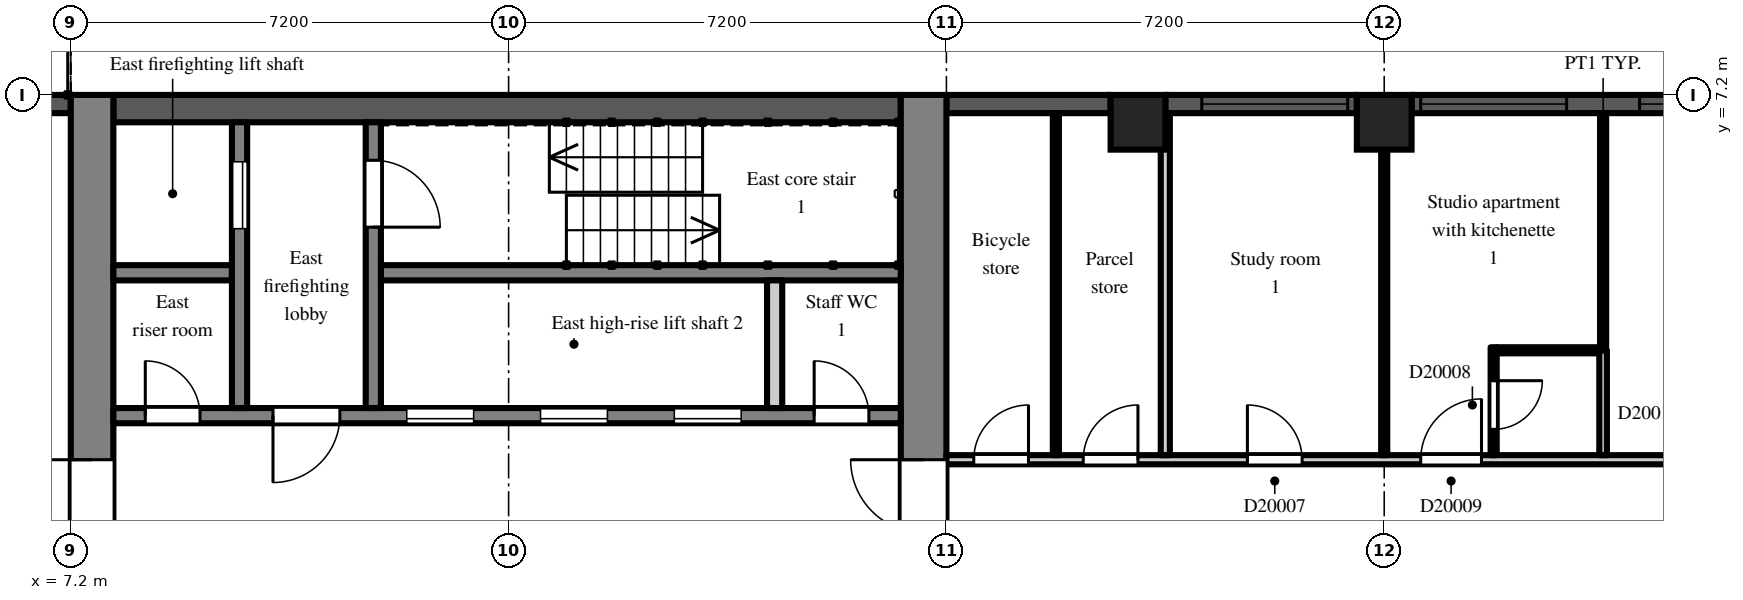
"""IFC4 building model, lengths in metres.
Left out: names, types, materials, properties, quantities, classifications, styles, units other than length and angle.
Written with IfcOpenShell. Run it as: python <this file> out.ifc"""

import sys

from ifc_helpers import new_model, si_unit, direction, frame, frame_2d, origin, origin_2d, place, context, subcontext, project, spatial, rectangle, extrude, element, fill, save


model = new_model("IFC4")
c1 = context("Model", 3, precision=1e-05, world=origin(), true_north=direction((0.0, 1.0)))
c2 = subcontext(c1, "Body", "Model", "MODEL_VIEW")
j1 = project(units=[si_unit("LENGTHUNIT", "METRE"), si_unit("PLANEANGLEUNIT", "RADIAN")], contexts=[c1])
p1 = place(None, origin())
s1 = spatial("IfcSite", under=j1, at=p1, CompositionType="ELEMENT")
p2 = place(p1, origin())
s2 = spatial("IfcBuilding", under=s1, at=p2, CompositionType="ELEMENT")
p3 = place(p2, frame((0.0, 0.0, 138.3)))
s3 = spatial("IfcBuildingStorey", under=s2, at=p3, CompositionType="ELEMENT", Elevation=138.3)
for number, where, z_axis, x_axis in (
    (1, (24.75, 6.75, 0.0), (0.0, 0.0, 1.0), (1.0, 0.0, 0.0)),
    (2, (28.8, 6.75, 0.0), (0.0, 0.0, 1.0), (1.0, 0.0, 0.0)),
):
    element("IfcColumn", number, at=place(p3, frame(where, z_axis=z_axis, x_axis=x_axis)), inside=s3, PredefinedType="COLUMN", context=c2, shape_type="SweptSolid", body=[
        extrude(rectangle(XDim=0.9, YDim=0.9, at=origin_2d()), origin(), (0.0, 0.0, 1.0), 3.0),
    ])
p4 = place(p3, frame((35.55, 7.05, 0.0), z_axis=(0.0, 0.0, 1.0), x_axis=(-1.0, 0.0, 0.0)))
e3 = element("IfcWall", 3, at=p4, inside=s3, PredefinedType="SOLIDWALL", context=c2, shape_type="SweptSolid", body=[
    extrude(rectangle(XDim=6.3, YDim=0.3, at=frame_2d((3.15, 0.0))), origin(), (0.0, 0.0, 1.0), 2.2),
])
p5 = place(p4, frame((0.15, 0.0, 0.2)))
e4 = element("IfcOpeningElement", 4, at=p5, cuts=e3, PredefinedType="OPENING", context=c2, shape_type="SweptSolid", body=[
    extrude(rectangle(XDim=2.4, YDim=1.85, at=frame_2d((1.2, 0.925))), frame((0.0, 0.16, 0.0), z_axis=(0.0, -1.0, 0.0), x_axis=(1.0, 0.0, 0.0)), (0.0, 0.0, 1.0), 0.32),
])
p6 = place(p4, frame((3.75, 0.0, 0.2)))
e5 = element("IfcOpeningElement", 5, at=p6, cuts=e3, PredefinedType="OPENING", context=c2, shape_type="SweptSolid", body=[
    extrude(rectangle(XDim=2.4, YDim=1.85, at=frame_2d((1.2, 0.925))), frame((0.0, 0.16, 0.0), z_axis=(0.0, -1.0, 0.0), x_axis=(1.0, 0.0, 0.0)), (0.0, 0.0, 1.0), 0.32),
])
p7 = place(p3, frame((28.35, 7.05, 0.0), z_axis=(0.0, 0.0, 1.0), x_axis=(-1.0, 0.0, 0.0)))
e6 = element("IfcWall", 6, at=p7, inside=s3, PredefinedType="SOLIDWALL", context=c2, shape_type="SweptSolid", body=[
    extrude(rectangle(XDim=3.15, YDim=0.3, at=frame_2d((1.575, 0.0))), origin(), (0.0, 0.0, 1.0), 2.2),
])
p8 = place(p7, frame((0.15, 0.0, 0.2)))
e7 = element("IfcOpeningElement", 7, at=p8, cuts=e6, PredefinedType="OPENING", context=c2, shape_type="SweptSolid", body=[
    extrude(rectangle(XDim=2.4, YDim=1.85, at=frame_2d((1.2, 0.925))), frame((0.0, 0.16, 0.0), z_axis=(0.0, -1.0, 0.0), x_axis=(1.0, 0.0, 0.0)), (0.0, 0.0, 1.0), 0.32),
])
p9 = place(p3, frame((24.3, 7.05, 0.0), z_axis=(0.0, 0.0, 1.0), x_axis=(-1.0, 0.0, 0.0)))
e8 = element("IfcWall", 8, at=p9, inside=s3, PredefinedType="SOLIDWALL", context=c2, shape_type="SweptSolid", body=[
    extrude(rectangle(XDim=2.7, YDim=0.3, at=frame_2d((1.35, 0.0))), origin(), (0.0, 0.0, 1.0), 2.2),
])
p10 = place(p3, frame((7.2, 7.05, 0.0), z_axis=(0.0, 0.0, 1.0), x_axis=(-1.0, 0.0, 0.0)))
e9 = element("IfcWall", 9, at=p10, inside=s3, PredefinedType="SOLIDWALL", context=c2, shape_type="SweptSolid", body=[
    extrude(rectangle(XDim=3.0, YDim=0.3, at=frame_2d((1.5, 0.0))), origin(), (0.0, 0.0, 1.0), 2.2),
])
p11 = place(p3, frame((7.55, -7.2, 0.0), z_axis=(0.0, 0.0, 1.0), x_axis=(0.0, 1.0, 0.0)))
e10 = element("IfcWall", 10, at=p11, inside=s3, PredefinedType="SHEAR", context=c2, shape_type="SweptSolid", body=[
    extrude(rectangle(XDim=14.4, YDim=0.7, at=frame_2d((7.2, 0.0))), origin(), (0.0, 0.0, 1.0), 2.6),
])
p12 = place(p11, frame((6.0, 0.0, 0.0)))
e11 = element("IfcOpeningElement", 11, at=p12, cuts=e10, PredefinedType="OPENING", context=c2, shape_type="SweptSolid", body=[
    extrude(rectangle(XDim=2.4, YDim=2.2, at=frame_2d((1.2, 1.1))), frame((0.0, 0.36, 0.0), z_axis=(0.0, -1.0, 0.0), x_axis=(1.0, 0.0, 0.0)), (0.0, 0.0, 1.0), 0.72),
])
p13 = place(p3, frame((21.225, -7.2, 0.0), z_axis=(0.0, 0.0, 1.0), x_axis=(0.0, 1.0, 0.0)))
e12 = element("IfcWall", 12, at=p13, inside=s3, PredefinedType="SHEAR", context=c2, shape_type="SweptSolid", body=[
    extrude(rectangle(XDim=14.4, YDim=0.75, at=frame_2d((7.2, 0.0))), origin(), (0.0, 0.0, 1.0), 2.6),
])
p14 = place(p13, frame((6.0, 0.0, 0.0)))
e13 = element("IfcOpeningElement", 13, at=p14, cuts=e12, PredefinedType="OPENING", context=c2, shape_type="SweptSolid", body=[
    extrude(rectangle(XDim=2.4, YDim=2.2, at=frame_2d((1.2, 1.1))), frame((0.0, 0.385, 0.0), z_axis=(0.0, -1.0, 0.0), x_axis=(1.0, 0.0, 0.0)), (0.0, 0.0, 1.0), 0.77),
])
p15 = place(p3, frame((7.9, 6.975, 0.0), z_axis=(0.0, 0.0, 1.0), x_axis=(1.0, 0.0, 0.0)))
e14 = element("IfcWall", 14, at=p15, inside=s3, PredefinedType="SHEAR", context=c2, shape_type="SweptSolid", body=[
    extrude(rectangle(XDim=12.95, YDim=0.45, at=frame_2d((6.475, 0.0))), origin(), (0.0, 0.0, 1.0), 2.6),
])
p16 = place(p3, frame((7.9, 1.925, 0.0), z_axis=(0.0, 0.0, 1.0), x_axis=(1.0, 0.0, 0.0)))
e15 = element("IfcWall", 15, at=p16, inside=s3, PredefinedType="SHEAR", context=c2, shape_type="SweptSolid", body=[
    extrude(rectangle(XDim=12.95, YDim=0.25, at=frame_2d((6.475, 0.0))), origin(), (0.0, 0.0, 1.0), 2.6),
])
p17 = place(p16, frame((4.825, 0.0, 0.0)))
e16 = element("IfcOpeningElement", 16, at=p17, cuts=e15, PredefinedType="OPENING", context=c2, shape_type="SweptSolid", body=[
    extrude(rectangle(XDim=1.1, YDim=2.1, at=frame_2d((0.55, 1.05))), frame((0.0, 0.135, 0.0), z_axis=(0.0, -1.0, 0.0), x_axis=(1.0, 0.0, 0.0)), (0.0, 0.0, 1.0), 0.27),
])
p18 = place(p16, frame((7.025, 0.0, 0.0)))
e17 = element("IfcOpeningElement", 17, at=p18, cuts=e15, PredefinedType="OPENING", context=c2, shape_type="SweptSolid", body=[
    extrude(rectangle(XDim=1.1, YDim=2.1, at=frame_2d((0.55, 1.05))), frame((0.0, 0.135, 0.0), z_axis=(0.0, -1.0, 0.0), x_axis=(1.0, 0.0, 0.0)), (0.0, 0.0, 1.0), 0.27),
])
p19 = place(p16, frame((9.225, 0.0, 0.0)))
e18 = element("IfcOpeningElement", 18, at=p19, cuts=e15, PredefinedType="OPENING", context=c2, shape_type="SweptSolid", body=[
    extrude(rectangle(XDim=1.1, YDim=2.1, at=frame_2d((0.55, 1.05))), frame((0.0, 0.135, 0.0), z_axis=(0.0, -1.0, 0.0), x_axis=(1.0, 0.0, 0.0)), (0.0, 0.0, 1.0), 0.27),
])
p20 = place(p16, frame((0.525, 0.0, 0.0)))
e19 = element("IfcOpeningElement", 19, at=p20, cuts=e15, PredefinedType="OPENING", context=c2, shape_type="SweptSolid", body=[
    extrude(rectangle(XDim=0.9, YDim=2.1, at=frame_2d((0.45, 1.05))), frame((0.0, 0.135, 0.0), z_axis=(0.0, -1.0, 0.0), x_axis=(1.0, 0.0, 0.0)), (0.0, 0.0, 1.0), 0.27),
])
p21 = place(p16, frame((2.625, 0.0, 0.0)))
e20 = element("IfcOpeningElement", 20, at=p21, cuts=e15, PredefinedType="OPENING", context=c2, shape_type="SweptSolid", body=[
    extrude(rectangle(XDim=1.1, YDim=2.1, at=frame_2d((0.55, 1.05))), frame((0.0, 0.135, 0.0), z_axis=(0.0, -1.0, 0.0), x_axis=(1.0, 0.0, 0.0)), (0.0, 0.0, 1.0), 0.27),
])
p22 = place(p16, frame((11.525, 0.0, 0.0)))
e21 = element("IfcOpeningElement", 21, at=p22, cuts=e15, PredefinedType="OPENING", context=c2, shape_type="SweptSolid", body=[
    extrude(rectangle(XDim=0.9, YDim=2.1, at=frame_2d((0.45, 1.05))), frame((0.0, 0.135, 0.0), z_axis=(0.0, -1.0, 0.0), x_axis=(1.0, 0.0, 0.0)), (0.0, 0.0, 1.0), 0.27),
])
p23 = place(p3, frame((7.9, 4.275, 0.0), z_axis=(0.0, 0.0, 1.0), x_axis=(1.0, 0.0, 0.0)))
e22 = element("IfcWall", 22, at=p23, inside=s3, PredefinedType="SHEAR", context=c2, shape_type="SweptSolid", body=[
    extrude(rectangle(XDim=1.95, YDim=0.25, at=frame_2d((0.975, 0.0))), origin(), (0.0, 0.0, 1.0), 2.6),
])
p24 = place(p3, frame((12.3, 4.275, 0.0), z_axis=(0.0, 0.0, 1.0), x_axis=(1.0, 0.0, 0.0)))
e23 = element("IfcWall", 23, at=p24, inside=s3, PredefinedType="SHEAR", context=c2, shape_type="SweptSolid", body=[
    extrude(rectangle(XDim=8.55, YDim=0.25, at=frame_2d((4.275, 0.0))), origin(), (0.0, 0.0, 1.0), 2.6),
])
p25 = place(p3, frame((9.975, 2.05, 0.0), z_axis=(0.0, 0.0, 1.0), x_axis=(0.0, 1.0, 0.0)))
e24 = element("IfcWall", 24, at=p25, inside=s3, PredefinedType="SHEAR", context=c2, shape_type="SweptSolid", body=[
    extrude(rectangle(XDim=4.7, YDim=0.25, at=frame_2d((2.35, 0.0))), origin(), (0.0, 0.0, 1.0), 2.6),
])
p26 = place(p25, frame((2.95, 0.0, 0.0)))
e25 = element("IfcOpeningElement", 25, at=p26, cuts=e24, PredefinedType="OPENING", context=c2, shape_type="SweptSolid", body=[
    extrude(rectangle(XDim=1.1, YDim=2.1, at=frame_2d((0.55, 1.05))), frame((0.0, 0.135, 0.0), z_axis=(0.0, -1.0, 0.0), x_axis=(1.0, 0.0, 0.0)), (0.0, 0.0, 1.0), 0.27),
])
p27 = place(p3, frame((12.175, 2.05, 0.0), z_axis=(0.0, 0.0, 1.0), x_axis=(0.0, 1.0, 0.0)))
e26 = element("IfcWall", 26, at=p27, inside=s3, PredefinedType="SHEAR", context=c2, shape_type="SweptSolid", body=[
    extrude(rectangle(XDim=4.7, YDim=0.25, at=frame_2d((2.35, 0.0))), origin(), (0.0, 0.0, 1.0), 2.6),
])
p28 = place(p27, frame((2.975, 0.0, 0.0)))
e27 = element("IfcOpeningElement", 27, at=p28, cuts=e26, PredefinedType="OPENING", context=c2, shape_type="SweptSolid", body=[
    extrude(rectangle(XDim=1.1, YDim=2.1, at=frame_2d((0.55, 1.05))), frame((0.0, 0.135, 0.0), z_axis=(0.0, -1.0, 0.0), x_axis=(1.0, 0.0, 0.0)), (0.0, 0.0, 1.0), 0.27),
])
p29 = place(p3, frame((18.775, 2.05, 0.0), z_axis=(0.0, 0.0, 1.0), x_axis=(0.0, 1.0, 0.0)))
e28 = element("IfcWall", 28, at=p29, inside=s3, PredefinedType="PARTITIONING", context=c2, shape_type="SweptSolid", body=[
    extrude(rectangle(XDim=2.1, YDim=0.25, at=frame_2d((1.05, 0.0))), origin(), (0.0, 0.0, 1.0), 2.6),
])
p30 = place(p3, frame((21.6, 1.2, 0.0), z_axis=(0.0, 0.0, 1.0), x_axis=(1.0, 0.0, 0.0)))
e29 = element("IfcWall", 29, at=p30, inside=s3, PredefinedType="PARTITIONING", context=c2, shape_type="SweptSolid", body=[
    extrude(rectangle(XDim=14.9, YDim=0.15, at=frame_2d((7.45, 0.0))), origin(), (0.0, 0.0, 1.0), 2.6),
])
p31 = place(p30, frame((0.45, 0.0, 0.0)))
e30 = element("IfcOpeningElement", 30, at=p31, cuts=e29, PredefinedType="OPENING", context=c2, shape_type="SweptSolid", body=[
    extrude(rectangle(XDim=0.9, YDim=2.1, at=frame_2d((0.45, 1.05))), frame((0.0, 0.085, 0.0), z_axis=(0.0, -1.0, 0.0), x_axis=(1.0, 0.0, 0.0)), (0.0, 0.0, 1.0), 0.17),
])
p32 = place(p30, frame((2.25, 0.0, 0.0)))
e31 = element("IfcOpeningElement", 31, at=p32, cuts=e29, PredefinedType="OPENING", context=c2, shape_type="SweptSolid", body=[
    extrude(rectangle(XDim=0.9, YDim=2.1, at=frame_2d((0.45, 1.05))), frame((0.0, 0.085, 0.0), z_axis=(0.0, -1.0, 0.0), x_axis=(1.0, 0.0, 0.0)), (0.0, 0.0, 1.0), 0.17),
])
p33 = place(p30, frame((4.95, 0.0, 0.0)))
e32 = element("IfcOpeningElement", 32, at=p33, cuts=e29, PredefinedType="OPENING", context=c2, shape_type="SweptSolid", body=[
    extrude(rectangle(XDim=0.9, YDim=2.1, at=frame_2d((0.45, 1.05))), frame((0.0, 0.085, 0.0), z_axis=(0.0, -1.0, 0.0), x_axis=(1.0, 0.0, 0.0)), (0.0, 0.0, 1.0), 0.17),
])
p34 = place(p30, frame((7.8, 0.0, 0.0)))
e33 = element("IfcOpeningElement", 33, at=p34, cuts=e29, PredefinedType="OPENING", context=c2, shape_type="SweptSolid", body=[
    extrude(rectangle(XDim=1.0, YDim=2.1, at=frame_2d((0.5, 1.05))), frame((0.0, 0.085, 0.0), z_axis=(0.0, -1.0, 0.0), x_axis=(1.0, 0.0, 0.0)), (0.0, 0.0, 1.0), 0.17),
])
p35 = place(p30, frame((11.95, 0.0, 0.0)))
e34 = element("IfcOpeningElement", 34, at=p35, cuts=e29, PredefinedType="OPENING", context=c2, shape_type="SweptSolid", body=[
    extrude(rectangle(XDim=1.8, YDim=2.1, at=frame_2d((0.9, 1.05))), frame((0.0, 0.085, 0.0), z_axis=(0.0, -1.0, 0.0), x_axis=(1.0, 0.0, 0.0)), (0.0, 0.0, 1.0), 0.17),
])
p36 = place(p3, frame((23.4, 1.275, 0.0), z_axis=(0.0, 0.0, 1.0), x_axis=(0.0, 1.0, 0.0)))
e35 = element("IfcWall", 35, at=p36, inside=s3, PredefinedType="PARTITIONING", context=c2, shape_type="SweptSolid", body=[
    extrude(rectangle(XDim=5.625, YDim=0.1, at=frame_2d((2.812, 0.0))), origin(), (0.0, 0.0, 1.0), 2.6),
])
p37 = place(p3, frame((25.2, 1.275, 0.0), z_axis=(0.0, 0.0, 1.0), x_axis=(0.0, 1.0, 0.0)))
e36 = element("IfcWall", 36, at=p37, inside=s3, PredefinedType="PARTITIONING", context=c2, shape_type="SweptSolid", body=[
    extrude(rectangle(XDim=5.625, YDim=0.15, at=frame_2d((2.812, 0.0))), origin(), (0.0, 0.0, 1.0), 2.6),
])
p38 = place(p3, frame((28.8, 1.275, 0.0), z_axis=(0.0, 0.0, 1.0), x_axis=(0.0, 1.0, 0.0)))
e37 = element("IfcWall", 37, at=p38, inside=s3, PredefinedType="PARTITIONING", context=c2, shape_type="SweptSolid", body=[
    extrude(rectangle(XDim=5.625, YDim=0.1, at=frame_2d((2.812, 0.0))), origin(), (0.0, 0.0, 1.0), 2.6),
])
p39 = place(p3, frame((30.6, 1.275, 0.0), z_axis=(0.0, 0.0, 1.0), x_axis=(0.0, 1.0, 0.0)))
e38 = element("IfcWall", 38, at=p39, inside=s3, PredefinedType="PARTITIONING", context=c2, shape_type="SweptSolid", body=[
    extrude(rectangle(XDim=1.775, YDim=0.1, at=frame_2d((0.888, 0.0))), origin(), (0.0, 0.0, 1.0), 2.6),
])
p40 = place(p39, frame((0.425, 0.0, 0.0)))
e39 = element("IfcOpeningElement", 39, at=p40, cuts=e38, PredefinedType="OPENING", context=c2, shape_type="SweptSolid", body=[
    extrude(rectangle(XDim=0.8, YDim=2.1, at=frame_2d((0.4, 1.05))), frame((0.0, 0.06, 0.0), z_axis=(0.0, -1.0, 0.0), x_axis=(1.0, 0.0, 0.0)), (0.0, 0.0, 1.0), 0.12),
])
p41 = place(p3, frame((30.65, 3.0, 0.0), z_axis=(0.0, 0.0, 1.0), x_axis=(1.0, 0.0, 0.0)))
e40 = element("IfcWall", 40, at=p41, inside=s3, PredefinedType="PARTITIONING", context=c2, shape_type="SweptSolid", body=[
    extrude(rectangle(XDim=1.688, YDim=0.1, at=frame_2d((0.844, 0.0))), origin(), (0.0, 0.0, 1.0), 2.6),
])
p42 = place(p3, frame((32.4, 1.275, 0.0), z_axis=(0.0, 0.0, 1.0), x_axis=(0.0, 1.0, 0.0)))
e41 = element("IfcWall", 41, at=p42, inside=s3, PredefinedType="PARTITIONING", context=c2, shape_type="SweptSolid", body=[
    extrude(rectangle(XDim=1.725, YDim=0.125, at=frame_2d((0.863, 0.0))), origin(), (0.0, 0.0, 1.0), 2.6),
])
p43 = place(p3, frame((32.4, 3.0, 0.0), z_axis=(0.0, 0.0, 1.0), x_axis=(0.0, 1.0, 0.0)))
e42 = element("IfcWall", 42, at=p43, inside=s3, PredefinedType="PARTITIONING", context=c2, shape_type="SweptSolid", body=[
    extrude(rectangle(XDim=3.9, YDim=0.1, at=frame_2d((1.95, 0.0))), origin(), (0.0, 0.0, 1.0), 2.6),
])
p44 = place(p5, origin())
e43 = element("IfcWindow", 43, at=p44, inside=s3, PartitioningType="SINGLE_PANEL", PredefinedType="WINDOW", context=c2, shape_type="SweptSolid", body=[
    extrude(rectangle(XDim=2.4, YDim=1.85, at=frame_2d((1.2, 0.925))), frame((0.0, 0.03, 0.0), z_axis=(0.0, -1.0, 0.0), x_axis=(1.0, 0.0, 0.0)), (0.0, 0.0, 1.0), 0.06),
])
fill(e4, e43)
p45 = place(p6, origin())
e44 = element("IfcWindow", 44, at=p45, inside=s3, PartitioningType="SINGLE_PANEL", PredefinedType="WINDOW", context=c2, shape_type="SweptSolid", body=[
    extrude(rectangle(XDim=2.4, YDim=1.85, at=frame_2d((1.2, 0.925))), frame((0.0, 0.03, 0.0), z_axis=(0.0, -1.0, 0.0), x_axis=(1.0, 0.0, 0.0)), (0.0, 0.0, 1.0), 0.06),
])
fill(e5, e44)
p46 = place(p8, origin())
e45 = element("IfcWindow", 45, at=p46, inside=s3, PartitioningType="SINGLE_PANEL", PredefinedType="WINDOW", context=c2, shape_type="SweptSolid", body=[
    extrude(rectangle(XDim=2.4, YDim=1.85, at=frame_2d((1.2, 0.925))), frame((0.0, 0.03, 0.0), z_axis=(0.0, -1.0, 0.0), x_axis=(1.0, 0.0, 0.0)), (0.0, 0.0, 1.0), 0.06),
])
fill(e7, e45)
p47 = place(p17, origin())
e46 = element("IfcDoor", 46, at=p47, inside=s3, OperationType="SLIDING_TO_LEFT", PredefinedType="DOOR", context=c2, shape_type="SweptSolid", body=[
    extrude(rectangle(XDim=1.1, YDim=2.1, at=frame_2d((0.55, 1.05))), frame((0.0, 0.025, 0.0), z_axis=(0.0, -1.0, 0.0), x_axis=(1.0, 0.0, 0.0)), (0.0, 0.0, 1.0), 0.05),
])
fill(e16, e46)
p48 = place(p18, origin())
e47 = element("IfcDoor", 47, at=p48, inside=s3, OperationType="SLIDING_TO_LEFT", PredefinedType="DOOR", context=c2, shape_type="SweptSolid", body=[
    extrude(rectangle(XDim=1.1, YDim=2.1, at=frame_2d((0.55, 1.05))), frame((0.0, 0.025, 0.0), z_axis=(0.0, -1.0, 0.0), x_axis=(1.0, 0.0, 0.0)), (0.0, 0.0, 1.0), 0.05),
])
fill(e17, e47)
p49 = place(p19, origin())
e48 = element("IfcDoor", 48, at=p49, inside=s3, OperationType="SLIDING_TO_LEFT", PredefinedType="DOOR", context=c2, shape_type="SweptSolid", body=[
    extrude(rectangle(XDim=1.1, YDim=2.1, at=frame_2d((0.55, 1.05))), frame((0.0, 0.025, 0.0), z_axis=(0.0, -1.0, 0.0), x_axis=(1.0, 0.0, 0.0)), (0.0, 0.0, 1.0), 0.05),
])
fill(e18, e48)
p50 = place(p26, origin())
e49 = element("IfcDoor", 49, at=p50, inside=s3, OperationType="SLIDING_TO_LEFT", PredefinedType="DOOR", context=c2, shape_type="SweptSolid", body=[
    extrude(rectangle(XDim=1.1, YDim=2.1, at=frame_2d((0.55, 1.05))), frame((0.0, 0.025, 0.0), z_axis=(0.0, -1.0, 0.0), x_axis=(1.0, 0.0, 0.0)), (0.0, 0.0, 1.0), 0.05),
])
fill(e25, e49)
p51 = place(p28, frame((1.1, 0.0, 0.0), z_axis=(0.0, 0.0, 1.0), x_axis=(-1.0, 0.0, 0.0)))
e50 = element("IfcDoor", 50, at=p51, inside=s3, OperationType="SINGLE_SWING_RIGHT", PredefinedType="DOOR", context=c2, shape_type="SweptSolid", body=[
    extrude(rectangle(XDim=1.1, YDim=2.1, at=frame_2d((0.55, 1.05))), frame((0.0, 0.025, 0.0), z_axis=(0.0, -1.0, 0.0), x_axis=(1.0, 0.0, 0.0)), (0.0, 0.0, 1.0), 0.05),
])
fill(e27, e50)
p52 = place(p20, origin())
e51 = element("IfcDoor", 51, at=p52, inside=s3, OperationType="SINGLE_SWING_LEFT", PredefinedType="DOOR", context=c2, shape_type="SweptSolid", body=[
    extrude(rectangle(XDim=0.9, YDim=2.1, at=frame_2d((0.45, 1.05))), frame((0.0, 0.025, 0.0), z_axis=(0.0, -1.0, 0.0), x_axis=(1.0, 0.0, 0.0)), (0.0, 0.0, 1.0), 0.05),
])
fill(e19, e51)
p53 = place(p21, frame((1.1, 0.0, 0.0), z_axis=(0.0, 0.0, 1.0), x_axis=(-1.0, 0.0, 0.0)))
e52 = element("IfcDoor", 52, at=p53, inside=s3, OperationType="SINGLE_SWING_RIGHT", PredefinedType="DOOR", context=c2, shape_type="SweptSolid", body=[
    extrude(rectangle(XDim=1.1, YDim=2.1, at=frame_2d((0.55, 1.05))), frame((0.0, 0.025, 0.0), z_axis=(0.0, -1.0, 0.0), x_axis=(1.0, 0.0, 0.0)), (0.0, 0.0, 1.0), 0.05),
])
fill(e20, e52)
p54 = place(p12, origin())
e53 = element("IfcDoor", 53, at=p54, inside=s3, OperationType="DOUBLE_DOOR_DOUBLE_SWING", PredefinedType="DOOR", context=c2, shape_type="SweptSolid", body=[
    extrude(rectangle(XDim=2.4, YDim=2.2, at=frame_2d((1.2, 1.1))), frame((0.0, 0.025, 0.0), z_axis=(0.0, -1.0, 0.0), x_axis=(1.0, 0.0, 0.0)), (0.0, 0.0, 1.0), 0.05),
])
fill(e11, e53)
p55 = place(p14, origin())
e54 = element("IfcDoor", 54, at=p55, inside=s3, OperationType="DOUBLE_DOOR_DOUBLE_SWING", PredefinedType="DOOR", context=c2, shape_type="SweptSolid", body=[
    extrude(rectangle(XDim=2.4, YDim=2.2, at=frame_2d((1.2, 1.1))), frame((0.0, 0.025, 0.0), z_axis=(0.0, -1.0, 0.0), x_axis=(1.0, 0.0, 0.0)), (0.0, 0.0, 1.0), 0.05),
])
fill(e13, e54)
p56 = place(p22, origin())
e55 = element("IfcDoor", 55, at=p56, inside=s3, OperationType="SINGLE_SWING_LEFT", PredefinedType="DOOR", context=c2, shape_type="SweptSolid", body=[
    extrude(rectangle(XDim=0.9, YDim=2.1, at=frame_2d((0.45, 1.05))), frame((0.0, 0.025, 0.0), z_axis=(0.0, -1.0, 0.0), x_axis=(1.0, 0.0, 0.0)), (0.0, 0.0, 1.0), 0.05),
])
fill(e21, e55)
p57 = place(p31, origin())
e56 = element("IfcDoor", 56, at=p57, inside=s3, OperationType="SINGLE_SWING_RIGHT", PredefinedType="DOOR", context=c2, shape_type="SweptSolid", body=[
    extrude(rectangle(XDim=0.9, YDim=2.1, at=frame_2d((0.45, 1.05))), frame((0.0, 0.025, 0.0), z_axis=(0.0, -1.0, 0.0), x_axis=(1.0, 0.0, 0.0)), (0.0, 0.0, 1.0), 0.05),
])
fill(e30, e56)
p58 = place(p32, origin())
e57 = element("IfcDoor", 57, at=p58, inside=s3, OperationType="SINGLE_SWING_RIGHT", PredefinedType="DOOR", context=c2, shape_type="SweptSolid", body=[
    extrude(rectangle(XDim=0.9, YDim=2.1, at=frame_2d((0.45, 1.05))), frame((0.0, 0.025, 0.0), z_axis=(0.0, -1.0, 0.0), x_axis=(1.0, 0.0, 0.0)), (0.0, 0.0, 1.0), 0.05),
])
fill(e31, e57)
p59 = place(p33, origin())
e58 = element("IfcDoor", 58, at=p59, inside=s3, OperationType="SINGLE_SWING_LEFT", PredefinedType="DOOR", context=c2, shape_type="SweptSolid", body=[
    extrude(rectangle(XDim=0.9, YDim=2.1, at=frame_2d((0.45, 1.05))), frame((0.0, 0.025, 0.0), z_axis=(0.0, -1.0, 0.0), x_axis=(1.0, 0.0, 0.0)), (0.0, 0.0, 1.0), 0.05),
])
fill(e32, e58)
p60 = place(p40, frame((0.8, 0.0, 0.0), z_axis=(0.0, 0.0, 1.0), x_axis=(-1.0, 0.0, 0.0)))
e59 = element("IfcDoor", 59, at=p60, inside=s3, OperationType="SINGLE_SWING_LEFT", PredefinedType="DOOR", context=c2, shape_type="SweptSolid", body=[
    extrude(rectangle(XDim=0.8, YDim=2.1, at=frame_2d((0.4, 1.05))), frame((0.0, 0.025, 0.0), z_axis=(0.0, -1.0, 0.0), x_axis=(1.0, 0.0, 0.0)), (0.0, 0.0, 1.0), 0.05),
])
fill(e39, e59)
p61 = place(p34, origin())
e60 = element("IfcDoor", 60, at=p61, inside=s3, OperationType="SINGLE_SWING_RIGHT", PredefinedType="DOOR", context=c2, shape_type="SweptSolid", body=[
    extrude(rectangle(XDim=1.0, YDim=2.1, at=frame_2d((0.5, 1.05))), frame((0.0, 0.025, 0.0), z_axis=(0.0, -1.0, 0.0), x_axis=(1.0, 0.0, 0.0)), (0.0, 0.0, 1.0), 0.05),
])
fill(e33, e60)
save(model, sys.argv[1])
